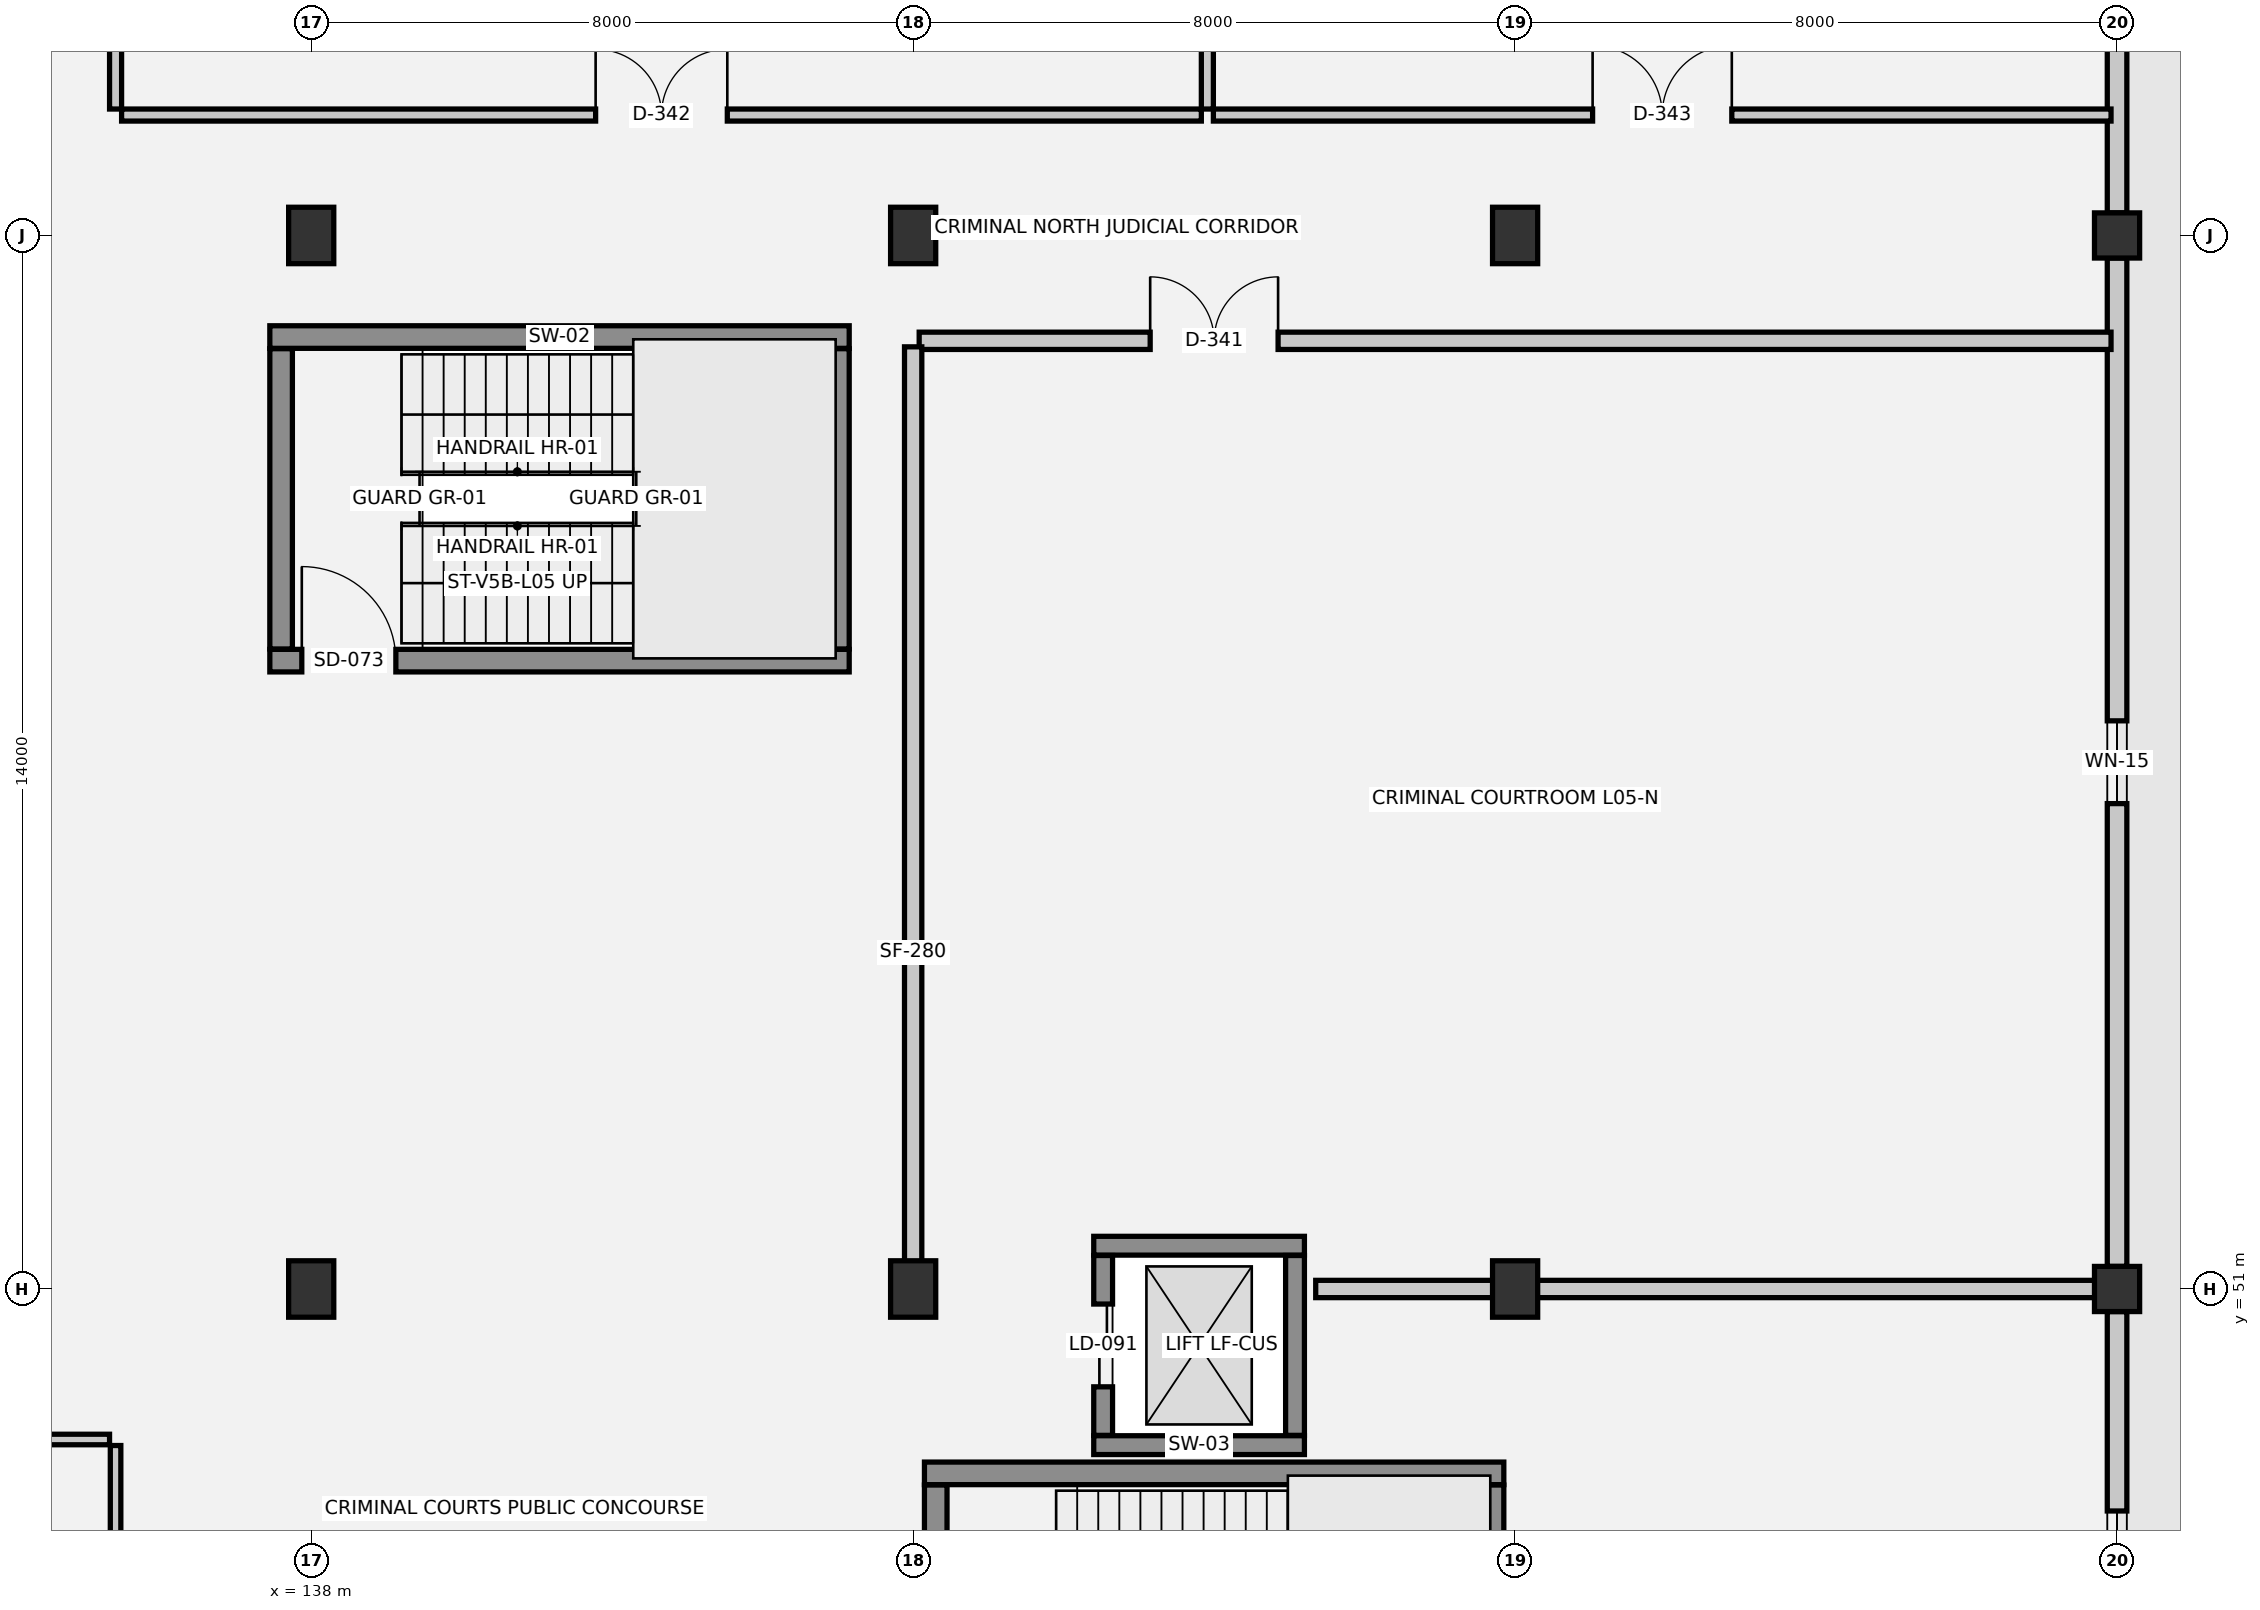
"""IFC4 building model, lengths in metres.
Left out: names, types, materials, properties, quantities, classifications, styles, units other than length and angle.
Written with IfcOpenShell. Run it as: python <this file> out.ifc"""

import sys

from ifc_helpers import new_model, si_unit, direction, frame, frame_2d, origin, origin_2d, place, context, subcontext, project, spatial, rectangle, extrude, element, fill, save


model = new_model("IFC4")
c1 = context("Model", 3, precision=1e-05, world=origin(), true_north=direction((0.0, 1.0)))
c2 = subcontext(c1, "Body", "Model", "MODEL_VIEW")
j1 = project(units=[si_unit("LENGTHUNIT", "METRE"), si_unit("PLANEANGLEUNIT", "RADIAN")], contexts=[c1])
p1 = place(None, origin())
s1 = spatial("IfcSite", under=j1, at=p1, CompositionType="ELEMENT")
p2 = place(p1, origin())
s2 = spatial("IfcBuilding", under=s1, at=p2, CompositionType="ELEMENT")
p3 = place(p2, frame((0.0, 0.0, 18.3)))
s3 = spatial("IfcBuildingStorey", under=s2, at=p3, CompositionType="ELEMENT", Elevation=18.3)
for number, where, z_axis, x_axis in (
    (1, (138.0, 51.0, 0.0), (0.0, 0.0, 1.0), (1.0, 0.0, 0.0)),
    (2, (138.0, 65.0, 0.0), (0.0, 0.0, 1.0), (1.0, 0.0, 0.0)),
    (3, (146.0, 51.0, 0.0), (0.0, 0.0, 1.0), (1.0, 0.0, 0.0)),
    (4, (146.0, 65.0, 0.0), (0.0, 0.0, 1.0), (1.0, 0.0, 0.0)),
    (5, (154.0, 51.0, 0.0), (0.0, 0.0, 1.0), (1.0, 0.0, 0.0)),
    (6, (154.0, 65.0, 0.0), (0.0, 0.0, 1.0), (1.0, 0.0, 0.0)),
):
    element("IfcColumn", number, at=place(p3, frame(where, z_axis=z_axis, x_axis=x_axis)), inside=s3, PredefinedType="COLUMN", context=c2, shape_type="SweptSolid", body=[
        extrude(rectangle(XDim=0.6, YDim=0.75, at=origin_2d()), origin(), (0.0, 0.0, 1.0), 3.75),
    ])
for number, where, z_axis, x_axis in (
    (7, (162.0, 51.0, 0.0), (0.0, 0.0, 1.0), (1.0, 0.0, 0.0)),
    (8, (162.0, 65.0, 0.0), (0.0, 0.0, 1.0), (1.0, 0.0, 0.0)),
):
    element("IfcColumn", number, at=place(p3, frame(where, z_axis=z_axis, x_axis=x_axis)), inside=s3, PredefinedType="COLUMN", context=c2, shape_type="SweptSolid", body=[
        extrude(rectangle(XDim=0.6, YDim=0.6, at=origin_2d()), origin(), (0.0, 0.0, 1.0), 3.75),
    ])
p4 = place(p3, frame((162.0, 71.7, 0.0), z_axis=(0.0, 0.0, 1.0), x_axis=(0.0, -1.0, 0.0)))
e9 = element("IfcWall", 9, at=p4, inside=s3, PredefinedType="SOLIDWALL", context=c2, shape_type="SweptSolid", body=[
    extrude(rectangle(XDim=6.4, YDim=0.26, at=frame_2d((3.2, 0.0))), origin(), (0.0, 0.0, 1.0), 2.55),
])
p5 = place(p4, frame((2.65, 0.0, 1.0)))
e10 = element("IfcOpeningElement", 10, at=p5, cuts=e9, PredefinedType="OPENING", context=c2, shape_type="SweptSolid", body=[
    extrude(rectangle(XDim=1.1, YDim=1.2, at=frame_2d((0.55, 0.6))), frame((0.0, 0.14, 0.0), z_axis=(0.0, -1.0, 0.0), x_axis=(1.0, 0.0, 0.0)), (0.0, 0.0, 1.0), 0.28),
])
p6 = place(p3, frame((162.0, 64.7, 0.0), z_axis=(0.0, 0.0, 1.0), x_axis=(0.0, -1.0, 0.0)))
e11 = element("IfcWall", 11, at=p6, inside=s3, PredefinedType="SOLIDWALL", context=c2, shape_type="SweptSolid", body=[
    extrude(rectangle(XDim=13.4, YDim=0.26, at=frame_2d((6.7, 0.0))), origin(), (0.0, 0.0, 1.0), 2.55),
])
p7 = place(p6, frame((6.15, 0.0, 1.0)))
e12 = element("IfcOpeningElement", 12, at=p7, cuts=e11, PredefinedType="OPENING", context=c2, shape_type="SweptSolid", body=[
    extrude(rectangle(XDim=1.1, YDim=1.2, at=frame_2d((0.55, 0.6))), frame((0.0, 0.14, 0.0), z_axis=(0.0, -1.0, 0.0), x_axis=(1.0, 0.0, 0.0)), (0.0, 0.0, 1.0), 0.28),
])
p8 = place(p3, frame((162.0, 50.7, 0.0), z_axis=(0.0, 0.0, 1.0), x_axis=(0.0, -1.0, 0.0)))
e13 = element("IfcWall", 13, at=p8, inside=s3, PredefinedType="SOLIDWALL", context=c2, shape_type="SweptSolid", body=[
    extrude(rectangle(XDim=6.4, YDim=0.26, at=frame_2d((3.2, 0.0))), origin(), (0.0, 0.0, 1.0), 2.55),
])
p9 = place(p8, frame((2.65, 0.0, 1.0)))
e14 = element("IfcOpeningElement", 14, at=p9, cuts=e13, PredefinedType="OPENING", context=c2, shape_type="SweptSolid", body=[
    extrude(rectangle(XDim=1.1, YDim=1.2, at=frame_2d((0.55, 0.6))), frame((0.0, 0.14, 0.0), z_axis=(0.0, -1.0, 0.0), x_axis=(1.0, 0.0, 0.0)), (0.0, 0.0, 1.0), 0.28),
])
for number, where, z_axis, x_axis in (
    (15, (148.4, 48.925, 0.0), (0.0, 0.0, 1.0), (1.0, 0.0, 0.0)),
    (16, (151.2, 51.575, 0.0), (0.0, 0.0, 1.0), (-1.0, 0.0, 0.0)),
):
    element("IfcWall", number, at=place(p3, frame(where, z_axis=z_axis, x_axis=x_axis)), inside=s3, PredefinedType="SHEAR", context=c2, shape_type="SweptSolid", body=[
        extrude(rectangle(XDim=2.8, YDim=0.25, at=frame_2d((1.4, 0.0))), origin(), (0.0, 0.0, 1.0), 3.75),
    ])
p10 = place(p3, frame((148.525, 51.445, 0.0), z_axis=(0.0, 0.0, 1.0), x_axis=(0.0, -1.0, 0.0)))
e17 = element("IfcWall", 17, at=p10, inside=s3, PredefinedType="SHEAR", context=c2, shape_type="SweptSolid", body=[
    extrude(rectangle(XDim=2.39, YDim=0.25, at=frame_2d((1.195, 0.0))), origin(), (0.0, 0.0, 1.0), 3.75),
])
p11 = place(p10, frame((0.645, 0.0, 0.0)))
e18 = element("IfcOpeningElement", 18, at=p11, cuts=e17, PredefinedType="OPENING", context=c2, shape_type="SweptSolid", body=[
    extrude(rectangle(XDim=1.1, YDim=2.15, at=frame_2d((0.55, 1.075))), frame((0.0, 0.135, 0.0), z_axis=(0.0, -1.0, 0.0), x_axis=(1.0, 0.0, 0.0)), (0.0, 0.0, 1.0), 0.27),
])
p12 = place(p3, frame((151.075, 49.055, 0.0), z_axis=(0.0, 0.0, 1.0), x_axis=(0.0, 1.0, 0.0)))
e19 = element("IfcWall", 19, at=p12, inside=s3, PredefinedType="SHEAR", context=c2, shape_type="SweptSolid", body=[
    extrude(rectangle(XDim=2.39, YDim=0.25, at=frame_2d((1.195, 0.0))), origin(), (0.0, 0.0, 1.0), 3.75),
])
p13 = place(p3, frame((145.15, 63.65, 0.0), z_axis=(0.0, 0.0, 1.0), x_axis=(-1.0, 0.0, 0.0)))
e20 = element("IfcWall", 20, at=p13, inside=s3, PredefinedType="SHEAR", context=c2, shape_type="SweptSolid", body=[
    extrude(rectangle(XDim=7.7, YDim=0.3, at=frame_2d((3.85, 0.0))), origin(), (0.0, 0.0, 1.0), 3.47),
])
p14 = place(p3, frame((137.45, 59.35, 0.0), z_axis=(0.0, 0.0, 1.0), x_axis=(1.0, 0.0, 0.0)))
e21 = element("IfcWall", 21, at=p14, inside=s3, PredefinedType="SHEAR", context=c2, shape_type="SweptSolid", body=[
    extrude(rectangle(XDim=7.7, YDim=0.3, at=frame_2d((3.85, 0.0))), origin(), (0.0, 0.0, 1.0), 3.47),
])
p15 = place(p14, frame((0.425, 0.0, 0.0)))
e22 = element("IfcOpeningElement", 22, at=p15, cuts=e21, PredefinedType="OPENING", context=c2, shape_type="SweptSolid", body=[
    extrude(rectangle(XDim=1.25, YDim=2.15, at=frame_2d((0.625, 1.075))), frame((0.0, 0.16, 0.0), z_axis=(0.0, -1.0, 0.0), x_axis=(1.0, 0.0, 0.0)), (0.0, 0.0, 1.0), 0.32),
])
for number, where, z_axis, x_axis in (
    (23, (137.6, 63.495, 0.0), (0.0, 0.0, 1.0), (0.0, -1.0, 0.0)),
    (24, (145.0, 59.505, 0.0), (0.0, 0.0, 1.0), (0.0, 1.0, 0.0)),
):
    element("IfcWall", number, at=place(p3, frame(where, z_axis=z_axis, x_axis=x_axis)), inside=s3, PredefinedType="SHEAR", context=c2, shape_type="SweptSolid", body=[
        extrude(rectangle(XDim=3.99, YDim=0.3, at=frame_2d((1.995, 0.0))), origin(), (0.0, 0.0, 1.0), 3.47),
    ])
p16 = place(p3, frame((153.85, 48.55, 0.0), z_axis=(0.0, 0.0, 1.0), x_axis=(-1.0, 0.0, 0.0)))
e25 = element("IfcWall", 25, at=p16, inside=s3, PredefinedType="SHEAR", context=c2, shape_type="SweptSolid", body=[
    extrude(rectangle(XDim=7.7, YDim=0.3, at=frame_2d((3.85, 0.0))), origin(), (0.0, 0.0, 1.0), 3.47),
])
p17 = place(p3, frame((146.3, 48.395, 0.0), z_axis=(0.0, 0.0, 1.0), x_axis=(0.0, -1.0, 0.0)))
e26 = element("IfcWall", 26, at=p17, inside=s3, PredefinedType="SHEAR", context=c2, shape_type="SweptSolid", body=[
    extrude(rectangle(XDim=3.99, YDim=0.3, at=frame_2d((1.995, 0.0))), origin(), (0.0, 0.0, 1.0), 3.47),
])
p18 = place(p17, frame((1.37, 0.0, 0.0)))
e27 = element("IfcOpeningElement", 27, at=p18, cuts=e26, PredefinedType="OPENING", context=c2, shape_type="SweptSolid", body=[
    extrude(rectangle(XDim=1.25, YDim=2.15, at=frame_2d((0.625, 1.075))), frame((0.0, 0.16, 0.0), z_axis=(0.0, -1.0, 0.0), x_axis=(1.0, 0.0, 0.0)), (0.0, 0.0, 1.0), 0.32),
])
p19 = place(p3, frame((153.7, 44.405, 0.0), z_axis=(0.0, 0.0, 1.0), x_axis=(0.0, 1.0, 0.0)))
e28 = element("IfcWall", 28, at=p19, inside=s3, PredefinedType="SHEAR", context=c2, shape_type="SweptSolid", body=[
    extrude(rectangle(XDim=3.99, YDim=0.3, at=frame_2d((1.995, 0.0))), origin(), (0.0, 0.0, 1.0), 3.47),
])
p20 = place(p3, frame((130.08, 49.0, 0.0), z_axis=(0.0, 0.0, 1.0), x_axis=(1.0, 0.0, 0.0)))
e29 = element("IfcWall", 29, at=p20, inside=s3, PredefinedType="PLUMBINGWALL", context=c2, shape_type="SweptSolid", body=[
    extrude(rectangle(XDim=5.24, YDim=0.14, at=frame_2d((2.62, 0.0))), origin(), (0.0, 0.0, 1.0), 3.39),
])
p21 = place(p3, frame((151.35, 51.0, 0.0), z_axis=(0.0, 0.0, 1.0), x_axis=(1.0, 0.0, 0.0)))
e30 = element("IfcWall", 30, at=p21, inside=s3, PredefinedType="PARTITIONING", context=c2, shape_type="SweptSolid", body=[
    extrude(rectangle(XDim=10.57, YDim=0.23, at=frame_2d((5.285, 0.0))), origin(), (0.0, 0.0, 1.0), 2.82),
])
p22 = place(p3, frame((146.08, 63.6, 0.0), z_axis=(0.0, 0.0, 1.0), x_axis=(1.0, 0.0, 0.0)))
e31 = element("IfcWall", 31, at=p22, inside=s3, PredefinedType="PARTITIONING", context=c2, shape_type="SweptSolid", body=[
    extrude(rectangle(XDim=15.84, YDim=0.23, at=frame_2d((7.92, 0.0))), origin(), (0.0, 0.0, 1.0), 3.39),
])
p23 = place(p22, frame((3.07, 0.0, 0.0)))
e32 = element("IfcOpeningElement", 32, at=p23, cuts=e31, PredefinedType="OPENING", context=c2, shape_type="SweptSolid", body=[
    extrude(rectangle(XDim=1.7, YDim=2.3, at=frame_2d((0.85, 1.15))), frame((0.0, 0.125, 0.0), z_axis=(0.0, -1.0, 0.0), x_axis=(1.0, 0.0, 0.0)), (0.0, 0.0, 1.0), 0.25),
])
p24 = place(p3, frame((135.48, 66.6, 0.0), z_axis=(0.0, 0.0, 1.0), x_axis=(1.0, 0.0, 0.0)))
e33 = element("IfcWall", 33, at=p24, inside=s3, PredefinedType="PARTITIONING", context=c2, shape_type="SweptSolid", body=[
    extrude(rectangle(XDim=14.35, YDim=0.16, at=frame_2d((7.175, 0.0))), origin(), (0.0, 0.0, 1.0), 3.39),
])
p25 = place(p24, frame((6.3, 0.0, 0.0)))
e34 = element("IfcOpeningElement", 34, at=p25, cuts=e33, PredefinedType="OPENING", context=c2, shape_type="SweptSolid", body=[
    extrude(rectangle(XDim=1.75, YDim=2.3, at=frame_2d((0.875, 1.15))), frame((0.0, 0.09, 0.0), z_axis=(0.0, -1.0, 0.0), x_axis=(1.0, 0.0, 0.0)), (0.0, 0.0, 1.0), 0.18),
])
p26 = place(p3, frame((149.99, 66.6, 0.0), z_axis=(0.0, 0.0, 1.0), x_axis=(1.0, 0.0, 0.0)))
e35 = element("IfcWall", 35, at=p26, inside=s3, PredefinedType="PARTITIONING", context=c2, shape_type="SweptSolid", body=[
    extrude(rectangle(XDim=11.93, YDim=0.16, at=frame_2d((5.965, 0.0))), origin(), (0.0, 0.0, 1.0), 3.39),
])
p27 = place(p26, frame((5.04, 0.0, 0.0)))
e36 = element("IfcOpeningElement", 36, at=p27, cuts=e35, PredefinedType="OPENING", context=c2, shape_type="SweptSolid", body=[
    extrude(rectangle(XDim=1.85, YDim=2.3, at=frame_2d((0.925, 1.15))), frame((0.0, 0.09, 0.0), z_axis=(0.0, -1.0, 0.0), x_axis=(1.0, 0.0, 0.0)), (0.0, 0.0, 1.0), 0.18),
])
p28 = place(p3, frame((135.4, 45.28, 0.0), z_axis=(0.0, 0.0, 1.0), x_axis=(0.0, 1.0, 0.0)))
e37 = element("IfcWall", 37, at=p28, inside=s3, PredefinedType="PLUMBINGWALL", context=c2, shape_type="SweptSolid", body=[
    extrude(rectangle(XDim=3.64, YDim=0.14, at=frame_2d((1.82, 0.0))), origin(), (0.0, 0.0, 1.0), 3.39),
])
p29 = place(p28, frame((1.36, 0.0, 0.0)))
e38 = element("IfcOpeningElement", 38, at=p29, cuts=e37, PredefinedType="OPENING", context=c2, shape_type="SweptSolid", body=[
    extrude(rectangle(XDim=0.92, YDim=2.1, at=frame_2d((0.46, 1.05))), frame((0.0, 0.08, 0.0), z_axis=(0.0, -1.0, 0.0), x_axis=(1.0, 0.0, 0.0)), (0.0, 0.0, 1.0), 0.16),
])
p30 = place(p3, frame((135.4, 66.68, 0.0), z_axis=(0.0, 0.0, 1.0), x_axis=(0.0, 1.0, 0.0)))
e39 = element("IfcWall", 39, at=p30, inside=s3, PredefinedType="PARTITIONING", context=c2, shape_type="SweptSolid", body=[
    extrude(rectangle(XDim=5.24, YDim=0.16, at=frame_2d((2.62, 0.0))), origin(), (0.0, 0.0, 1.0), 3.39),
])
p31 = place(p3, frame((146.0, 51.35, 0.0), z_axis=(0.0, 0.0, 1.0), x_axis=(0.0, 1.0, 0.0)))
e40 = element("IfcWall", 40, at=p31, inside=s3, PredefinedType="PARTITIONING", context=c2, shape_type="SweptSolid", body=[
    extrude(rectangle(XDim=12.17, YDim=0.23, at=frame_2d((6.085, 0.0))), origin(), (0.0, 0.0, 1.0), 2.62),
])
p32 = place(p3, frame((149.91, 66.68, 0.0), z_axis=(0.0, 0.0, 1.0), x_axis=(0.0, 1.0, 0.0)))
e41 = element("IfcWall", 41, at=p32, inside=s3, PredefinedType="PARTITIONING", context=c2, shape_type="SweptSolid", body=[
    extrude(rectangle(XDim=5.24, YDim=0.16, at=frame_2d((2.62, 0.0))), origin(), (0.0, 0.0, 1.0), 3.39),
])
p33 = place(p7, origin())
e42 = element("IfcWindow", 42, at=p33, inside=s3, PartitioningType="SINGLE_PANEL", PredefinedType="WINDOW", context=c2, shape_type="SweptSolid", body=[
    extrude(rectangle(XDim=1.1, YDim=1.2, at=frame_2d((0.55, 0.6))), frame((0.0, 0.03, 0.0), z_axis=(0.0, -1.0, 0.0), x_axis=(1.0, 0.0, 0.0)), (0.0, 0.0, 1.0), 0.06),
])
fill(e12, e42)
p34 = place(p9, origin())
e43 = element("IfcWindow", 43, at=p34, inside=s3, PartitioningType="SINGLE_PANEL", PredefinedType="WINDOW", context=c2, shape_type="SweptSolid", body=[
    extrude(rectangle(XDim=1.1, YDim=1.2, at=frame_2d((0.55, 0.6))), frame((0.0, 0.03, 0.0), z_axis=(0.0, -1.0, 0.0), x_axis=(1.0, 0.0, 0.0)), (0.0, 0.0, 1.0), 0.06),
])
fill(e14, e43)
p35 = place(p11, origin())
e44 = element("IfcDoor", 44, at=p35, inside=s3, OperationType="DOUBLE_DOOR_SLIDING", PredefinedType="DOOR", context=c2, shape_type="SweptSolid", body=[
    extrude(rectangle(XDim=1.1, YDim=2.15, at=frame_2d((0.55, 1.075))), frame((0.0, 0.025, 0.0), z_axis=(0.0, -1.0, 0.0), x_axis=(1.0, 0.0, 0.0)), (0.0, 0.0, 1.0), 0.05),
])
fill(e18, e44)
p36 = place(p15, origin())
e45 = element("IfcDoor", 45, at=p36, inside=s3, OperationType="SINGLE_SWING_LEFT", PredefinedType="DOOR", context=c2, shape_type="SweptSolid", body=[
    extrude(rectangle(XDim=1.25, YDim=2.15, at=frame_2d((0.625, 1.075))), frame((0.0, 0.025, 0.0), z_axis=(0.0, -1.0, 0.0), x_axis=(1.0, 0.0, 0.0)), (0.0, 0.0, 1.0), 0.05),
])
fill(e22, e45)
p37 = place(p23, origin())
e46 = element("IfcDoor", 46, at=p37, inside=s3, OperationType="DOUBLE_DOOR_SINGLE_SWING", PredefinedType="DOOR", context=c2, shape_type="SweptSolid", body=[
    extrude(rectangle(XDim=1.7, YDim=2.3, at=frame_2d((0.85, 1.15))), frame((0.0, 0.025, 0.0), z_axis=(0.0, -1.0, 0.0), x_axis=(1.0, 0.0, 0.0)), (0.0, 0.0, 1.0), 0.05),
])
fill(e32, e46)
p38 = place(p25, origin())
e47 = element("IfcDoor", 47, at=p38, inside=s3, OperationType="DOUBLE_DOOR_SINGLE_SWING", PredefinedType="DOOR", context=c2, shape_type="SweptSolid", body=[
    extrude(rectangle(XDim=1.75, YDim=2.3, at=frame_2d((0.875, 1.15))), frame((0.0, 0.025, 0.0), z_axis=(0.0, -1.0, 0.0), x_axis=(1.0, 0.0, 0.0)), (0.0, 0.0, 1.0), 0.05),
])
fill(e34, e47)
p39 = place(p27, origin())
e48 = element("IfcDoor", 48, at=p39, inside=s3, OperationType="DOUBLE_DOOR_SINGLE_SWING", PredefinedType="DOOR", context=c2, shape_type="SweptSolid", body=[
    extrude(rectangle(XDim=1.85, YDim=2.3, at=frame_2d((0.925, 1.15))), frame((0.0, 0.025, 0.0), z_axis=(0.0, -1.0, 0.0), x_axis=(1.0, 0.0, 0.0)), (0.0, 0.0, 1.0), 0.05),
])
fill(e36, e48)
save(model, sys.argv[1])
